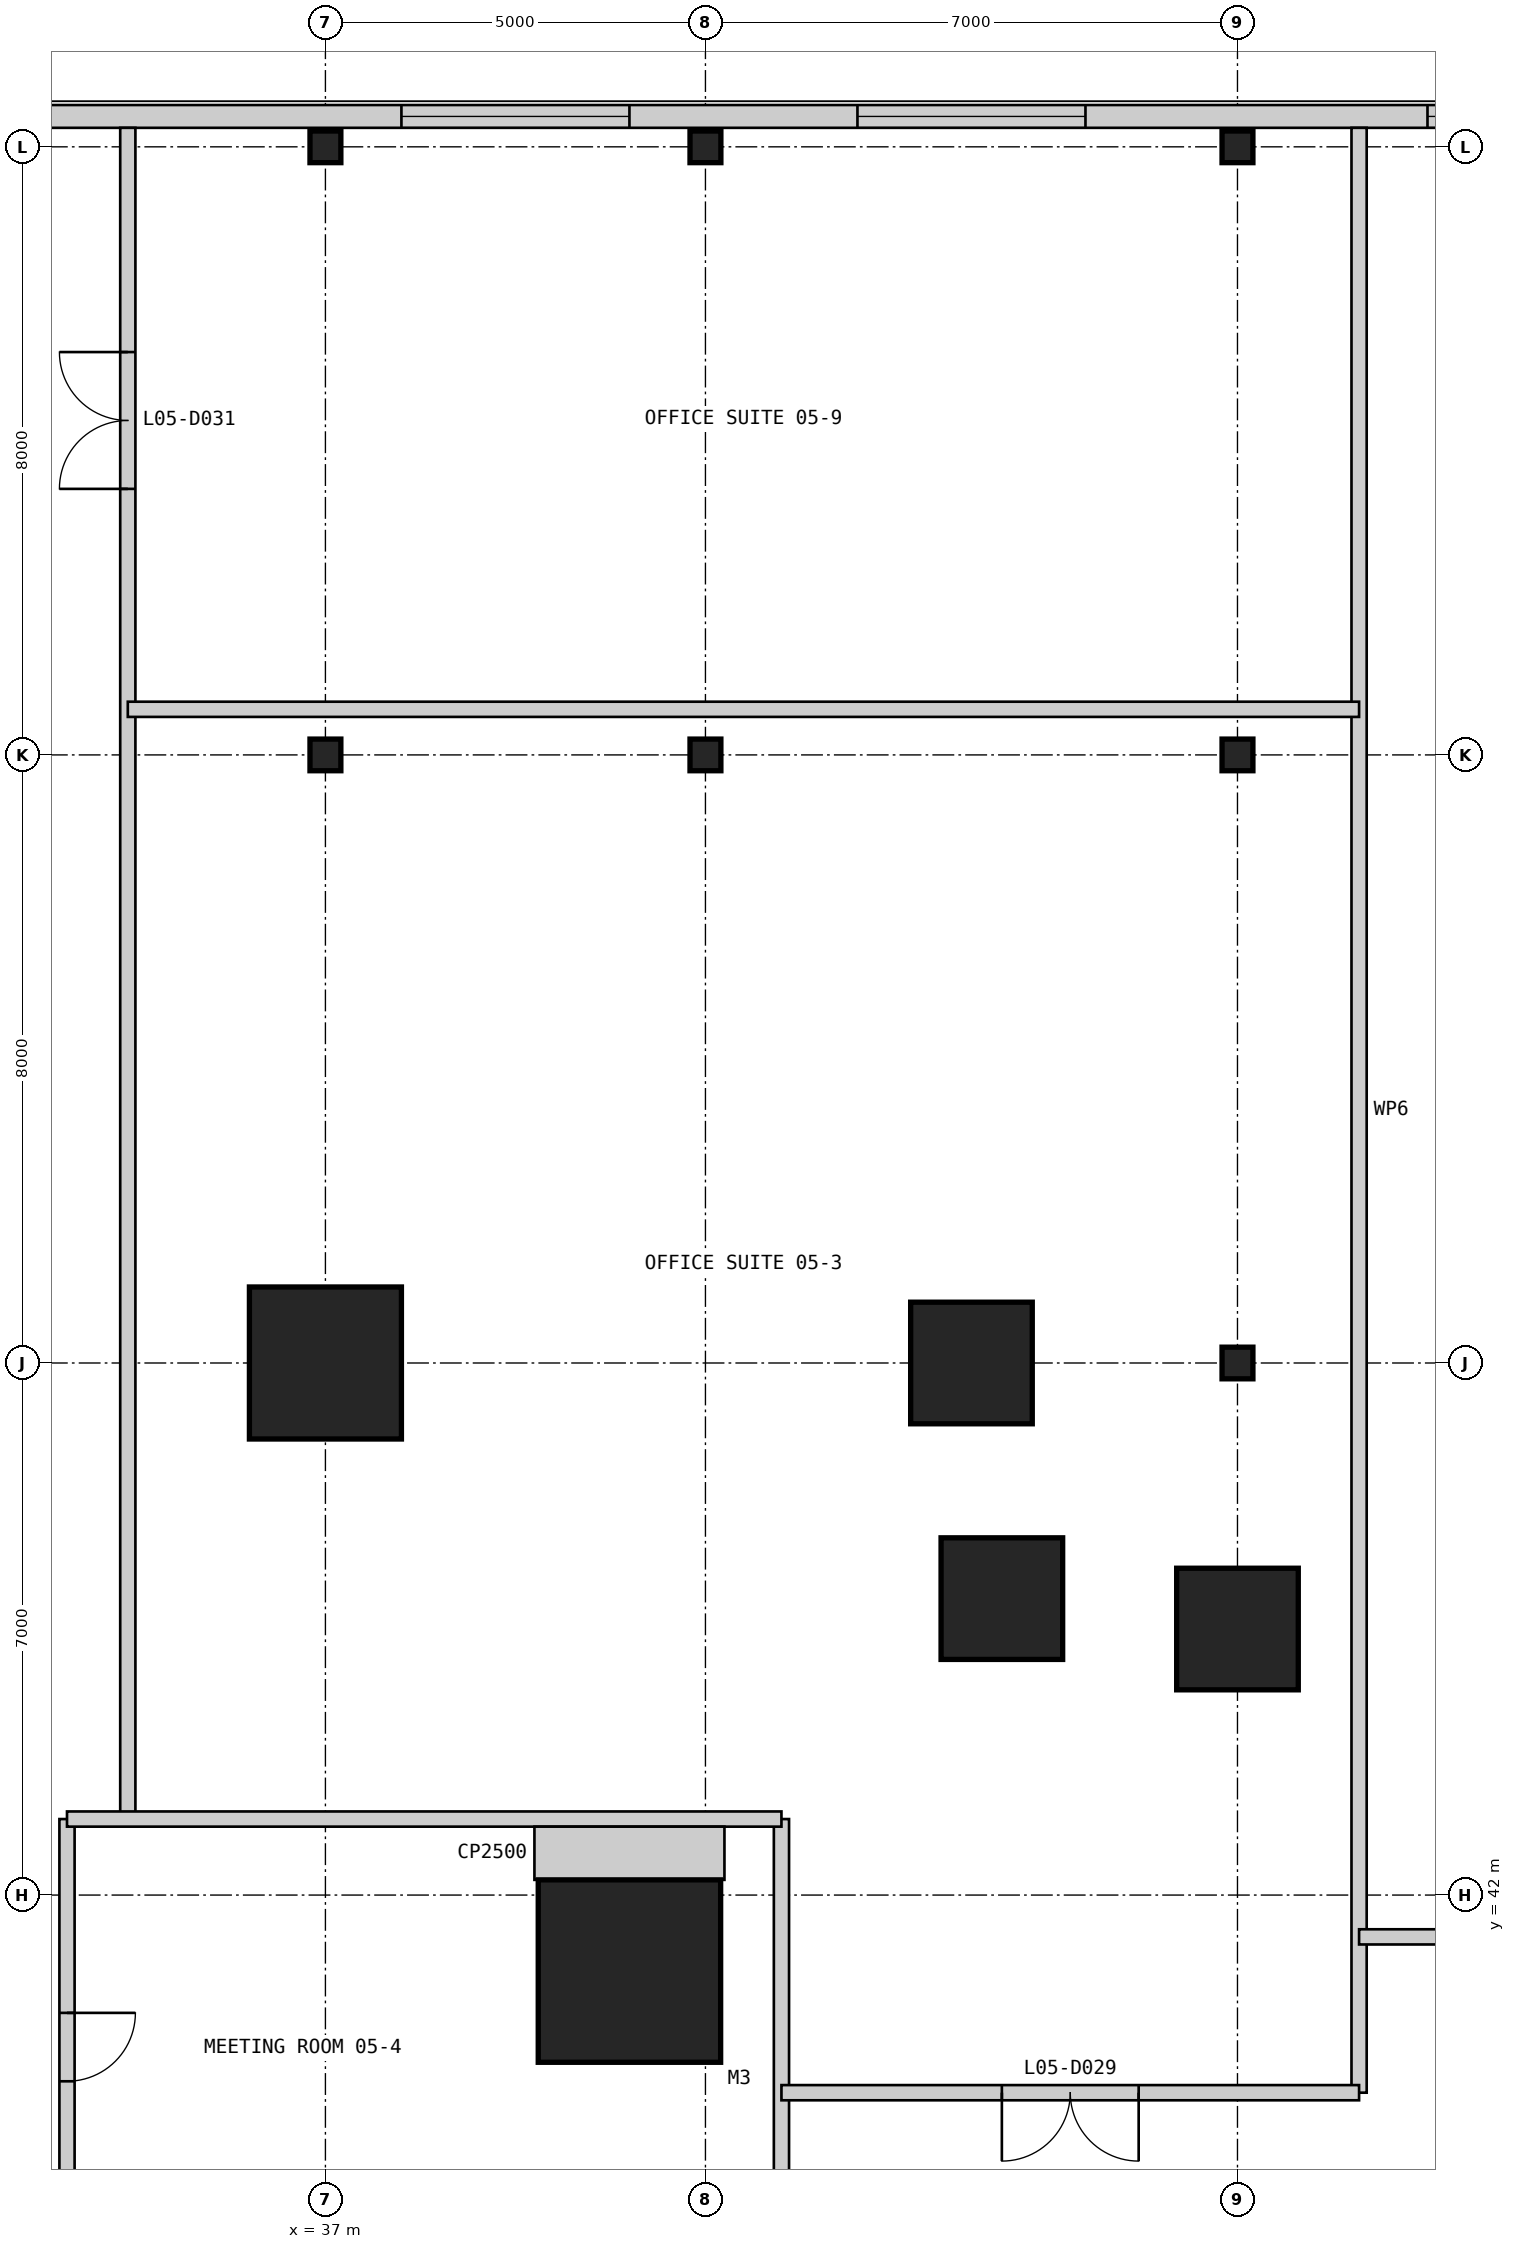
"""IFC4 building model, lengths in metres.
Left out: names, types, materials, properties, quantities, classifications, styles, units other than length and angle.
Written with IfcOpenShell. Run it as: python <this file> out.ifc"""

import sys

from ifc_helpers import new_model, si_unit, direction, frame, frame_2d, origin, origin_2d, place, context, subcontext, project, spatial, rectangle, i_section, extrude, element, fill, save


model = new_model("IFC4")
c1 = context("Model", 3, precision=1e-05, world=origin(), true_north=direction((0.0, 1.0)))
c2 = subcontext(c1, "Body", "Model", "MODEL_VIEW")
j1 = project(units=[si_unit("LENGTHUNIT", "METRE"), si_unit("PLANEANGLEUNIT", "RADIAN")], contexts=[c1])
p1 = place(None, origin())
s1 = spatial("IfcSite", under=j1, at=p1, CompositionType="ELEMENT")
p2 = place(p1, origin())
s2 = spatial("IfcBuilding", under=s1, at=p2, CompositionType="ELEMENT")
p3 = place(p2, frame((0.0, 0.0, 26.2)))
s3 = spatial("IfcBuildingStorey", under=s2, at=p3, CompositionType="ELEMENT", Elevation=26.2)
p4 = place(p3, frame((41.0, 41.0, 0.0), z_axis=(0.0, 0.0, 1.0), x_axis=(1.0, 0.0, 0.0)))
e1 = element("IfcColumn", 1, at=p4, inside=s3, PredefinedType="COLUMN", context=c2, shape_type="SweptSolid", body=[
    extrude(rectangle(XDim=2.4, YDim=2.4, at=origin_2d()), origin(), (0.0, 0.0, 1.0), 4.8),
])
for number, where, z_axis, x_axis in (
    (2, (49.0, 45.5, 0.0), (0.0, 0.0, 1.0), (1.0, 0.0, 0.0)),
    (3, (45.9, 45.9, 0.0), (0.0, 0.0, 1.0), (1.0, 0.0, 0.0)),
    (4, (45.5, 49.0, 0.0), (0.0, 0.0, 1.0), (1.0, 0.0, 0.0)),
):
    element("IfcColumn", number, at=place(p3, frame(where, z_axis=z_axis, x_axis=x_axis)), inside=s3, PredefinedType="COLUMN", context=c2, shape_type="SweptSolid", body=[
        extrude(rectangle(XDim=1.6, YDim=1.6, at=origin_2d()), origin(), (0.0, 0.0, 1.0), 4.8),
    ])
p5 = place(p3, frame((37.0, 49.0, 0.0), z_axis=(0.0, 0.0, 1.0), x_axis=(1.0, 0.0, 0.0)))
e5 = element("IfcColumn", 5, at=p5, inside=s3, PredefinedType="COLUMN", context=c2, shape_type="SweptSolid", body=[
    extrude(rectangle(XDim=2.0, YDim=2.0, at=origin_2d()), origin(), (0.0, 0.0, 1.0), 4.8),
])
for number, where, z_axis, x_axis in (
    (6, (37.0, 57.0, 0.0), (0.0, 0.0, 1.0), (1.0, 0.0, 0.0)),
    (7, (37.0, 65.0, 0.0), (0.0, 0.0, 1.0), (1.0, 0.0, 0.0)),
    (8, (42.0, 57.0, 0.0), (0.0, 0.0, 1.0), (1.0, 0.0, 0.0)),
    (9, (42.0, 65.0, 0.0), (0.0, 0.0, 1.0), (1.0, 0.0, 0.0)),
    (10, (49.0, 49.0, 0.0), (0.0, 0.0, 1.0), (1.0, 0.0, 0.0)),
    (11, (49.0, 57.0, 0.0), (0.0, 0.0, 1.0), (1.0, 0.0, 0.0)),
    (12, (49.0, 65.0, 0.0), (0.0, 0.0, 1.0), (1.0, 0.0, 0.0)),
):
    element("IfcColumn", number, at=place(p3, frame(where, z_axis=z_axis, x_axis=x_axis)), inside=s3, PredefinedType="COLUMN", context=c2, shape_type="SweptSolid", body=[
        extrude(i_section(OverallWidth=0.406, OverallDepth=0.417, WebThickness=0.03, FlangeThickness=0.048, at=origin_2d()), origin(), (0.0, 0.0, 1.0), 4.8),
    ])
p6 = place(p3, frame((57.55, 65.4, 0.0), z_axis=(0.0, 0.0, 1.0), x_axis=(-1.0, 0.0, 0.0)))
e13 = element("IfcWall", 13, at=p6, inside=s3, PredefinedType="SOLIDWALL", context=c2, shape_type="SweptSolid", body=[
    extrude(rectangle(XDim=65.1, YDim=0.3, at=frame_2d((32.55, 0.0))), origin(), (0.0, 0.0, 1.0), 4.5),
])
p7 = place(p6, frame((59.05, 0.0, 0.9)))
e14 = element("IfcOpeningElement", 14, at=p7, cuts=e13, PredefinedType="OPENING", context=c2, shape_type="SweptSolid", body=[
    extrude(rectangle(XDim=3.0, YDim=2.4, at=frame_2d((1.5, 1.2))), frame((0.0, 0.16, 0.0), z_axis=(0.0, -1.0, 0.0), x_axis=(1.0, 0.0, 0.0)), (0.0, 0.0, 1.0), 0.32),
])
p8 = place(p6, frame((51.05, 0.0, 0.9)))
e15 = element("IfcOpeningElement", 15, at=p8, cuts=e13, PredefinedType="OPENING", context=c2, shape_type="SweptSolid", body=[
    extrude(rectangle(XDim=3.0, YDim=2.4, at=frame_2d((1.5, 1.2))), frame((0.0, 0.16, 0.0), z_axis=(0.0, -1.0, 0.0), x_axis=(1.0, 0.0, 0.0)), (0.0, 0.0, 1.0), 0.32),
])
p9 = place(p6, frame((37.05, 0.0, 0.9)))
e16 = element("IfcOpeningElement", 16, at=p9, cuts=e13, PredefinedType="OPENING", context=c2, shape_type="SweptSolid", body=[
    extrude(rectangle(XDim=3.0, YDim=2.4, at=frame_2d((1.5, 1.2))), frame((0.0, 0.16, 0.0), z_axis=(0.0, -1.0, 0.0), x_axis=(1.0, 0.0, 0.0)), (0.0, 0.0, 1.0), 0.32),
])
p10 = place(p6, frame((25.05, 0.0, 0.9)))
e17 = element("IfcOpeningElement", 17, at=p10, cuts=e13, PredefinedType="OPENING", context=c2, shape_type="SweptSolid", body=[
    extrude(rectangle(XDim=3.0, YDim=2.4, at=frame_2d((1.5, 1.2))), frame((0.0, 0.16, 0.0), z_axis=(0.0, -1.0, 0.0), x_axis=(1.0, 0.0, 0.0)), (0.0, 0.0, 1.0), 0.32),
])
p11 = place(p6, frame((16.55, 0.0, 0.9)))
e18 = element("IfcOpeningElement", 18, at=p11, cuts=e13, PredefinedType="OPENING", context=c2, shape_type="SweptSolid", body=[
    extrude(rectangle(XDim=3.0, YDim=2.4, at=frame_2d((1.5, 1.2))), frame((0.0, 0.16, 0.0), z_axis=(0.0, -1.0, 0.0), x_axis=(1.0, 0.0, 0.0)), (0.0, 0.0, 1.0), 0.32),
])
p12 = place(p6, frame((10.55, 0.0, 0.9)))
e19 = element("IfcOpeningElement", 19, at=p12, cuts=e13, PredefinedType="OPENING", context=c2, shape_type="SweptSolid", body=[
    extrude(rectangle(XDim=3.0, YDim=2.4, at=frame_2d((1.5, 1.2))), frame((0.0, 0.16, 0.0), z_axis=(0.0, -1.0, 0.0), x_axis=(1.0, 0.0, 0.0)), (0.0, 0.0, 1.0), 0.32),
])
p13 = place(p6, frame((3.05, 0.0, 0.9)))
e20 = element("IfcOpeningElement", 20, at=p13, cuts=e13, PredefinedType="OPENING", context=c2, shape_type="SweptSolid", body=[
    extrude(rectangle(XDim=3.0, YDim=2.4, at=frame_2d((1.5, 1.2))), frame((0.0, 0.16, 0.0), z_axis=(0.0, -1.0, 0.0), x_axis=(1.0, 0.0, 0.0)), (0.0, 0.0, 1.0), 0.32),
])
p14 = place(p3, frame((33.6, 37.0, 0.0), z_axis=(0.0, 0.0, 1.0), x_axis=(0.0, 1.0, 0.0)))
e21 = element("IfcWall", 21, at=p14, inside=s3, PredefinedType="PARTITIONING", context=c2, shape_type="SweptSolid", body=[
    extrude(rectangle(XDim=6.0, YDim=0.2, at=frame_2d((3.0, 0.0))), origin(), (0.0, 0.0, 1.0), 4.5),
])
p15 = place(p14, frame((2.55, 0.0, 0.0)))
e22 = element("IfcOpeningElement", 22, at=p15, cuts=e21, PredefinedType="OPENING", context=c2, shape_type="SweptSolid", body=[
    extrude(rectangle(XDim=0.9, YDim=2.2, at=frame_2d((0.45, 1.1))), frame((0.0, 0.11, 0.0), z_axis=(0.0, -1.0, 0.0), x_axis=(1.0, 0.0, 0.0)), (0.0, 0.0, 1.0), 0.22),
])
p16 = place(p3, frame((34.4, 43.0, 0.0), z_axis=(0.0, 0.0, 1.0), x_axis=(0.0, 1.0, 0.0)))
e23 = element("IfcWall", 23, at=p16, inside=s3, PredefinedType="PARTITIONING", context=c2, shape_type="SweptSolid", body=[
    extrude(rectangle(XDim=22.25, YDim=0.2, at=frame_2d((11.125, 0.0))), origin(), (0.0, 0.0, 1.0), 4.5),
])
p17 = place(p16, frame((17.5, 0.0, 0.0)))
e24 = element("IfcOpeningElement", 24, at=p17, cuts=e23, PredefinedType="OPENING", context=c2, shape_type="SweptSolid", body=[
    extrude(rectangle(XDim=1.8, YDim=2.4, at=frame_2d((0.9, 1.2))), frame((0.0, 0.11, 0.0), z_axis=(0.0, -1.0, 0.0), x_axis=(1.0, 0.0, 0.0)), (0.0, 0.0, 1.0), 0.22),
])
p18 = place(p3, frame((43.0, 37.0, 0.0), z_axis=(0.0, 0.0, 1.0), x_axis=(0.0, 1.0, 0.0)))
e25 = element("IfcWall", 25, at=p18, inside=s3, PredefinedType="PARTITIONING", context=c2, shape_type="SweptSolid", body=[
    extrude(rectangle(XDim=6.0, YDim=0.2, at=frame_2d((3.0, 0.0))), origin(), (0.0, 0.0, 1.0), 4.5),
])
p19 = place(p3, frame((50.6, 39.4, 0.0), z_axis=(0.0, 0.0, 1.0), x_axis=(0.0, 1.0, 0.0)))
e26 = element("IfcWall", 26, at=p19, inside=s3, PredefinedType="PARTITIONING", context=c2, shape_type="SweptSolid", body=[
    extrude(rectangle(XDim=25.85, YDim=0.2, at=frame_2d((12.925, 0.0))), origin(), (0.0, 0.0, 1.0), 4.5),
])
p20 = place(p3, frame((43.0, 39.4, 0.0), z_axis=(0.0, 0.0, 1.0), x_axis=(1.0, 0.0, 0.0)))
e27 = element("IfcWall", 27, at=p20, inside=s3, PredefinedType="PARTITIONING", context=c2, shape_type="SweptSolid", body=[
    extrude(rectangle(XDim=7.6, YDim=0.2, at=frame_2d((3.8, 0.0))), origin(), (0.0, 0.0, 1.0), 4.5),
])
p21 = place(p20, frame((2.9, 0.0, 0.0)))
e28 = element("IfcOpeningElement", 28, at=p21, cuts=e27, PredefinedType="OPENING", context=c2, shape_type="SweptSolid", body=[
    extrude(rectangle(XDim=1.8, YDim=2.4, at=frame_2d((0.9, 1.2))), frame((0.0, 0.11, 0.0), z_axis=(0.0, -1.0, 0.0), x_axis=(1.0, 0.0, 0.0)), (0.0, 0.0, 1.0), 0.22),
])
p22 = place(p3, frame((50.6, 41.45, 0.0), z_axis=(0.0, 0.0, 1.0), x_axis=(1.0, 0.0, 0.0)))
e29 = element("IfcWall", 29, at=p22, inside=s3, PredefinedType="PARTITIONING", context=c2, shape_type="SweptSolid", body=[
    extrude(rectangle(XDim=6.65, YDim=0.2, at=frame_2d((3.325, 0.0))), origin(), (0.0, 0.0, 1.0), 4.5),
])
p23 = place(p22, frame((2.425, 0.0, 0.0)))
e30 = element("IfcOpeningElement", 30, at=p23, cuts=e29, PredefinedType="OPENING", context=c2, shape_type="SweptSolid", body=[
    extrude(rectangle(XDim=1.8, YDim=2.4, at=frame_2d((0.9, 1.2))), frame((0.0, 0.11, 0.0), z_axis=(0.0, -1.0, 0.0), x_axis=(1.0, 0.0, 0.0)), (0.0, 0.0, 1.0), 0.22),
])
p24 = place(p3, frame((33.6, 43.0, 0.0), z_axis=(0.0, 0.0, 1.0), x_axis=(1.0, 0.0, 0.0)))
e31 = element("IfcWall", 31, at=p24, inside=s3, PredefinedType="PARTITIONING", context=c2, shape_type="SweptSolid", body=[
    extrude(rectangle(XDim=9.4, YDim=0.2, at=frame_2d((4.7, 0.0))), origin(), (0.0, 0.0, 1.0), 4.5),
])
p25 = place(p3, frame((34.4, 57.6, 0.0), z_axis=(0.0, 0.0, 1.0), x_axis=(1.0, 0.0, 0.0)))
e32 = element("IfcWall", 32, at=p25, inside=s3, PredefinedType="PARTITIONING", context=c2, shape_type="SweptSolid", body=[
    extrude(rectangle(XDim=16.2, YDim=0.2, at=frame_2d((8.1, 0.0))), origin(), (0.0, 0.0, 1.0), 4.5),
])
p26 = place(p3, frame((41.0, 42.9, 0.0), z_axis=(0.0, 0.0, 1.0), x_axis=(0.0, -1.0, 0.0)))
e33 = element("IfcWall", 33, at=p26, inside=s3, PredefinedType="PARTITIONING", context=c2, shape_type="SweptSolid", body=[
    extrude(rectangle(XDim=0.7, YDim=2.5, at=frame_2d((0.35, 0.0))), origin(), (0.0, 0.0, 1.0), 4.5),
])
p27 = place(p11, origin())
e34 = element("IfcWindow", 34, at=p27, inside=s3, PartitioningType="SINGLE_PANEL", PredefinedType="WINDOW", context=c2, shape_type="SweptSolid", body=[
    extrude(rectangle(XDim=3.0, YDim=2.4, at=frame_2d((1.5, 1.2))), frame((0.0, 0.03, 0.0), z_axis=(0.0, -1.0, 0.0), x_axis=(1.0, 0.0, 0.0)), (0.0, 0.0, 1.0), 0.06),
])
fill(e18, e34)
p28 = place(p12, origin())
e35 = element("IfcWindow", 35, at=p28, inside=s3, PartitioningType="SINGLE_PANEL", PredefinedType="WINDOW", context=c2, shape_type="SweptSolid", body=[
    extrude(rectangle(XDim=3.0, YDim=2.4, at=frame_2d((1.5, 1.2))), frame((0.0, 0.03, 0.0), z_axis=(0.0, -1.0, 0.0), x_axis=(1.0, 0.0, 0.0)), (0.0, 0.0, 1.0), 0.06),
])
fill(e19, e35)
p29 = place(p13, origin())
e36 = element("IfcWindow", 36, at=p29, inside=s3, PartitioningType="SINGLE_PANEL", PredefinedType="WINDOW", context=c2, shape_type="SweptSolid", body=[
    extrude(rectangle(XDim=3.0, YDim=2.4, at=frame_2d((1.5, 1.2))), frame((0.0, 0.03, 0.0), z_axis=(0.0, -1.0, 0.0), x_axis=(1.0, 0.0, 0.0)), (0.0, 0.0, 1.0), 0.06),
])
fill(e20, e36)
p30 = place(p21, frame((1.8, 0.0, 0.0), z_axis=(0.0, 0.0, 1.0), x_axis=(-1.0, 0.0, 0.0)))
e37 = element("IfcDoor", 37, at=p30, inside=s3, OperationType="DOUBLE_DOOR_SINGLE_SWING", PredefinedType="DOOR", context=c2, shape_type="SweptSolid", body=[
    extrude(rectangle(XDim=1.8, YDim=2.4, at=frame_2d((0.9, 1.2))), frame((0.0, 0.025, 0.0), z_axis=(0.0, -1.0, 0.0), x_axis=(1.0, 0.0, 0.0)), (0.0, 0.0, 1.0), 0.05),
])
fill(e28, e37)
p31 = place(p17, origin())
e38 = element("IfcDoor", 38, at=p31, inside=s3, OperationType="DOUBLE_DOOR_SINGLE_SWING", PredefinedType="DOOR", context=c2, shape_type="SweptSolid", body=[
    extrude(rectangle(XDim=1.8, YDim=2.4, at=frame_2d((0.9, 1.2))), frame((0.0, 0.025, 0.0), z_axis=(0.0, -1.0, 0.0), x_axis=(1.0, 0.0, 0.0)), (0.0, 0.0, 1.0), 0.05),
])
fill(e24, e38)
p32 = place(p15, frame((0.9, 0.0, 0.0), z_axis=(0.0, 0.0, 1.0), x_axis=(-1.0, 0.0, 0.0)))
e39 = element("IfcDoor", 39, at=p32, inside=s3, OperationType="SINGLE_SWING_LEFT", PredefinedType="DOOR", context=c2, shape_type="SweptSolid", body=[
    extrude(rectangle(XDim=0.9, YDim=2.2, at=frame_2d((0.45, 1.1))), frame((0.0, 0.025, 0.0), z_axis=(0.0, -1.0, 0.0), x_axis=(1.0, 0.0, 0.0)), (0.0, 0.0, 1.0), 0.05),
])
fill(e22, e39)
save(model, sys.argv[1])
